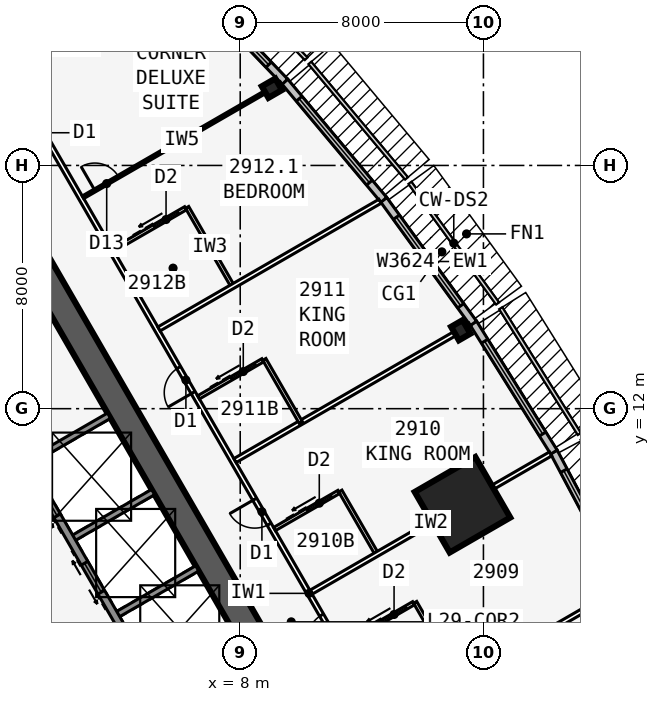
"""IFC4 building model, lengths in metres.
Left out: names, types, materials, properties, quantities, classifications, styles, units other than length and angle.
Written with IfcOpenShell. Run it as: python <this file> out.ifc"""

import sys

from ifc_helpers import new_model, si_unit, direction, frame, frame_2d, origin, origin_2d, place, context, subcontext, project, spatial, rectangle, i_section, extrude, element, fill, save


model = new_model("IFC4")
c1 = context("Model", 3, precision=1e-05, world=origin(), true_north=direction((0.0, 1.0)))
c2 = subcontext(c1, "Body", "Model", "MODEL_VIEW")
j1 = project(units=[si_unit("LENGTHUNIT", "METRE"), si_unit("PLANEANGLEUNIT", "RADIAN")], contexts=[c1])
p1 = place(None, origin())
s1 = spatial("IfcSite", under=j1, at=p1, CompositionType="ELEMENT")
p2 = place(p1, origin())
s2 = spatial("IfcBuilding", under=s1, at=p2, CompositionType="ELEMENT")
p3 = place(p2, frame((0.0, 0.0, 114.7)))
s3 = spatial("IfcBuildingStorey", under=s2, at=p3, CompositionType="ELEMENT", Elevation=114.7)
p4 = place(p3, frame((16.5, -9.526, 0.0), z_axis=(0.0, 0.0, 1.0), x_axis=(-0.499999749417, 0.866025548458, 0.0)))
e1 = element("IfcWall", 1, at=p4, inside=s3, PredefinedType="SHEAR", context=c2, shape_type="SweptSolid", body=[
    extrude(rectangle(XDim=33.0, YDim=0.9, at=frame_2d((16.5, 0.0))), origin(), (0.0, 0.0, 1.0), 3.4),
])
p5 = place(p4, frame((14.15, 0.0, 0.0)))
e2 = element("IfcOpeningElement", 2, at=p5, cuts=e1, PredefinedType="OPENING", context=c2, shape_type="SweptSolid", body=[
    extrude(rectangle(XDim=1.8, YDim=2.13, at=frame_2d((0.9, 1.065))), frame((0.0, 0.46, 0.0), z_axis=(0.0, -1.0, 0.0), x_axis=(1.0, 0.0, 0.0)), (0.0, 0.0, 1.0), 0.92),
])
p6 = place(p4, frame((12.6, 0.0, 0.0)))
e3 = element("IfcOpeningElement", 3, at=p6, cuts=e1, PredefinedType="OPENING", context=c2, shape_type="SweptSolid", body=[
    extrude(rectangle(XDim=1.0, YDim=2.13, at=frame_2d((0.5, 1.065))), frame((0.0, 0.46, 0.0), z_axis=(0.0, -1.0, 0.0), x_axis=(1.0, 0.0, 0.0)), (0.0, 0.0, 1.0), 0.92),
])
p7 = place(p3, frame((5.379, 2.586, 0.0), z_axis=(0.0, 0.0, 1.0), x_axis=(-0.500001375892, 0.866024609411, 0.0)))
e4 = element("IfcWall", 4, at=p7, inside=s3, PredefinedType="SOLIDWALL", context=c2, shape_type="SweptSolid", body=[
    extrude(rectangle(XDim=10.633, YDim=0.25, at=frame_2d((5.316, 0.0))), origin(), (0.0, 0.0, 1.0), 3.235),
])
p8 = place(p7, frame((9.164, 0.0, 0.0)))
e5 = element("IfcOpeningElement", 5, at=p8, cuts=e4, PredefinedType="OPENING", context=c2, shape_type="SweptSolid", body=[
    extrude(rectangle(XDim=0.9, YDim=2.13, at=frame_2d((0.45, 1.065))), frame((0.0, 0.135, 0.0), z_axis=(0.0, -1.0, 0.0), x_axis=(1.0, 0.0, 0.0)), (0.0, 0.0, 1.0), 0.27),
])
p9 = place(p7, frame((1.0, 0.0, 0.0)))
e6 = element("IfcOpeningElement", 6, at=p9, cuts=e4, PredefinedType="OPENING", context=c2, shape_type="SweptSolid", body=[
    extrude(rectangle(XDim=1.1, YDim=2.13, at=frame_2d((0.55, 1.065))), frame((0.0, 0.135, 0.0), z_axis=(0.0, -1.0, 0.0), x_axis=(1.0, 0.0, 0.0)), (0.0, 0.0, 1.0), 0.27),
])
p10 = place(p7, frame((3.9, 0.0, 0.0)))
e7 = element("IfcOpeningElement", 7, at=p10, cuts=e4, PredefinedType="OPENING", context=c2, shape_type="SweptSolid", body=[
    extrude(rectangle(XDim=1.1, YDim=2.13, at=frame_2d((0.55, 1.065))), frame((0.0, 0.135, 0.0), z_axis=(0.0, -1.0, 0.0), x_axis=(1.0, 0.0, 0.0)), (0.0, 0.0, 1.0), 0.27),
])
p11 = place(p7, frame((6.8, 0.0, 0.0)))
e8 = element("IfcOpeningElement", 8, at=p11, cuts=e4, PredefinedType="OPENING", context=c2, shape_type="SweptSolid", body=[
    extrude(rectangle(XDim=1.1, YDim=2.13, at=frame_2d((0.55, 1.065))), frame((0.0, 0.135, 0.0), z_axis=(0.0, -1.0, 0.0), x_axis=(1.0, 0.0, 0.0)), (0.0, 0.0, 1.0), 0.27),
])
for number, where, z_axis, x_axis in (
    (9, (3.879, 5.184, 0.0), (0.0, 0.0, 1.0), (0.866, 0.5, 0.0)),
    (10, (2.429, 7.696, 0.0), (0.0, 0.0, 1.0), (0.866, 0.5, 0.0)),
    (11, (0.979, 10.207, 0.0), (0.0, 0.0, 1.0), (0.866, 0.5, 0.0)),
):
    element("IfcWall", number, at=place(p3, frame(where, z_axis=z_axis, x_axis=x_axis)), inside=s3, PredefinedType="SOLIDWALL", context=c2, shape_type="SweptSolid", body=[
        extrude(rectangle(XDim=3.125, YDim=0.2, at=frame_2d((1.562, 0.0))), origin(), (0.0, 0.0, 1.0), 3.235),
    ])
for number, where, z_axis, x_axis in (
    (12, (15.254, 14.58, 0.0), (0.0, 0.0, 1.0), (0.866, 0.5, 0.0)),
    (13, (9.041, 22.541, 0.0), (0.0, 0.0, 1.0), (-0.5, 0.866, 0.0)),
):
    element("IfcColumn", number, at=place(p3, frame(where, z_axis=z_axis, x_axis=x_axis)), inside=s3, PredefinedType="COLUMN", context=c2, shape_type="SweptSolid", body=[
        extrude(i_section(OverallWidth=0.437, OverallDepth=0.513, WebThickness=0.061, FlangeThickness=0.097, at=origin_2d()), origin(), (0.0, 0.0, 1.0), 3.4),
    ])
p12 = place(p3, frame((15.312, 8.84, 0.0), z_axis=(0.0, 0.0, 1.0), x_axis=(0.866025403784, 0.5, 0.0)))
e14 = element("IfcColumn", 14, at=p12, inside=s3, PredefinedType="COLUMN", context=c2, shape_type="SweptSolid", body=[
    extrude(rectangle(XDim=2.3, YDim=2.3, at=origin_2d()), origin(), (0.0, 0.0, 1.0), 3.4),
])
p13 = place(p3, frame((20.663, 6.161, 0.0), z_axis=(0.0, 0.0, 1.0), x_axis=(-0.469404966864, 0.882982999317, 0.0)))
e15 = element("IfcWall", 15, at=p13, inside=s3, PredefinedType="STANDARD", context=c2, shape_type="SweptSolid", body=[
    extrude(rectangle(XDim=5.003, YDim=0.25, at=frame_2d((2.501, 0.0))), origin(), (0.0, 0.0, 1.0), 3.235),
])
p14 = place(p13, frame((0.701, 0.0, 0.45)))
e16 = element("IfcOpeningElement", 16, at=p14, cuts=e15, PredefinedType="OPENING", context=c2, shape_type="SweptSolid", body=[
    extrude(rectangle(XDim=3.6, YDim=2.4, at=frame_2d((1.8, 1.2))), frame((0.0, 0.135, 0.0), z_axis=(0.0, -1.0, 0.0), x_axis=(1.0, 0.0, 0.0)), (0.0, 0.0, 1.0), 0.27),
])
p15 = place(p3, frame((18.319, 10.571, 0.0), z_axis=(0.0, 0.0, 1.0), x_axis=(-0.529990167382, 0.84800378683, 0.0)))
e17 = element("IfcWall", 17, at=p15, inside=s3, PredefinedType="STANDARD", context=c2, shape_type="SweptSolid", body=[
    extrude(rectangle(XDim=5.003, YDim=0.25, at=frame_2d((2.501, 0.0))), origin(), (0.0, 0.0, 1.0), 3.235),
])
p16 = place(p15, frame((0.701, 0.0, 0.45)))
e18 = element("IfcOpeningElement", 18, at=p16, cuts=e17, PredefinedType="OPENING", context=c2, shape_type="SweptSolid", body=[
    extrude(rectangle(XDim=3.6, YDim=2.4, at=frame_2d((1.8, 1.2))), frame((0.0, 0.135, 0.0), z_axis=(0.0, -1.0, 0.0), x_axis=(1.0, 0.0, 0.0)), (0.0, 0.0, 1.0), 0.27),
])
p17 = place(p3, frame((15.672, 14.807, 0.0), z_axis=(0.0, 0.0, 1.0), x_axis=(-0.587669188412, 0.809101307001, 0.0)))
e19 = element("IfcWall", 19, at=p17, inside=s3, PredefinedType="STANDARD", context=c2, shape_type="SweptSolid", body=[
    extrude(rectangle(XDim=5.028, YDim=0.25, at=frame_2d((2.514, 0.0))), origin(), (0.0, 0.0, 1.0), 3.235),
])
p18 = place(p17, frame((0.714, 0.0, 0.45)))
e20 = element("IfcOpeningElement", 20, at=p18, cuts=e19, PredefinedType="OPENING", context=c2, shape_type="SweptSolid", body=[
    extrude(rectangle(XDim=3.6, YDim=2.4, at=frame_2d((1.8, 1.2))), frame((0.0, 0.135, 0.0), z_axis=(0.0, -1.0, 0.0), x_axis=(1.0, 0.0, 0.0)), (0.0, 0.0, 1.0), 0.27),
])
p19 = place(p3, frame((12.723, 18.868, 0.0), z_axis=(0.0, 0.0, 1.0), x_axis=(-0.641810386606, 0.766863369607, 0.0)))
e21 = element("IfcWall", 21, at=p19, inside=s3, PredefinedType="STANDARD", context=c2, shape_type="SweptSolid", body=[
    extrude(rectangle(XDim=5.076, YDim=0.25, at=frame_2d((2.538, 0.0))), origin(), (0.0, 0.0, 1.0), 3.235),
])
p20 = place(p19, frame((0.738, 0.0, 0.45)))
e22 = element("IfcOpeningElement", 22, at=p20, cuts=e21, PredefinedType="OPENING", context=c2, shape_type="SweptSolid", body=[
    extrude(rectangle(XDim=3.6, YDim=2.4, at=frame_2d((1.8, 1.2))), frame((0.0, 0.135, 0.0), z_axis=(0.0, -1.0, 0.0), x_axis=(1.0, 0.0, 0.0)), (0.0, 0.0, 1.0), 0.27),
])
p21 = place(p3, frame((9.471, 22.754, 0.0), z_axis=(0.0, 0.0, 1.0), x_axis=(-0.691719937936, 0.722165858693, 0.0)))
e23 = element("IfcWall", 23, at=p21, inside=s3, PredefinedType="STANDARD", context=c2, shape_type="SweptSolid", body=[
    extrude(rectangle(XDim=5.148, YDim=0.25, at=frame_2d((2.574, 0.0))), origin(), (0.0, 0.0, 1.0), 3.235),
])
p22 = place(p21, frame((0.774, 0.0, 0.45)))
e24 = element("IfcOpeningElement", 24, at=p22, cuts=e23, PredefinedType="OPENING", context=c2, shape_type="SweptSolid", body=[
    extrude(rectangle(XDim=3.6, YDim=2.4, at=frame_2d((1.8, 1.2))), frame((0.0, 0.135, 0.0), z_axis=(0.0, -1.0, 0.0), x_axis=(1.0, 0.0, 0.0)), (0.0, 0.0, 1.0), 0.27),
])
p23 = place(p3, frame((20.027, -10.985, 0.0), z_axis=(0.0, 0.0, 1.0), x_axis=(-0.500001677587, 0.866024435227, 0.0)))
e25 = element("IfcWall", 25, at=p23, inside=s3, PredefinedType="PARTITIONING", context=c2, shape_type="SweptSolid", body=[
    extrude(rectangle(XDim=39.054, YDim=0.15, at=frame_2d((19.527, 0.0))), origin(), (0.0, 0.0, 1.0), 3.235),
])
p24 = place(p23, frame((0.352, 0.0, 0.0)))
e26 = element("IfcOpeningElement", 26, at=p24, cuts=e25, PredefinedType="OPENING", context=c2, shape_type="SweptSolid", body=[
    extrude(rectangle(XDim=0.95, YDim=2.13, at=frame_2d((0.475, 1.065))), frame((0.0, 0.085, 0.0), z_axis=(0.0, -1.0, 0.0), x_axis=(1.0, 0.0, 0.0)), (0.0, 0.0, 1.0), 0.17),
])
p25 = place(p23, frame((7.752, 0.0, 0.0)))
e27 = element("IfcOpeningElement", 27, at=p25, cuts=e25, PredefinedType="OPENING", context=c2, shape_type="SweptSolid", body=[
    extrude(rectangle(XDim=0.95, YDim=2.13, at=frame_2d((0.475, 1.065))), frame((0.0, 0.085, 0.0), z_axis=(0.0, -1.0, 0.0), x_axis=(1.0, 0.0, 0.0)), (0.0, 0.0, 1.0), 0.17),
])
p26 = place(p23, frame((17.752, 0.0, 0.0)))
e28 = element("IfcOpeningElement", 28, at=p26, cuts=e25, PredefinedType="OPENING", context=c2, shape_type="SweptSolid", body=[
    extrude(rectangle(XDim=0.95, YDim=2.13, at=frame_2d((0.475, 1.065))), frame((0.0, 0.085, 0.0), z_axis=(0.0, -1.0, 0.0), x_axis=(1.0, 0.0, 0.0)), (0.0, 0.0, 1.0), 0.17),
])
p27 = place(p23, frame((22.152, 0.0, 0.0)))
e29 = element("IfcOpeningElement", 29, at=p27, cuts=e25, PredefinedType="OPENING", context=c2, shape_type="SweptSolid", body=[
    extrude(rectangle(XDim=0.95, YDim=2.13, at=frame_2d((0.475, 1.065))), frame((0.0, 0.085, 0.0), z_axis=(0.0, -1.0, 0.0), x_axis=(1.0, 0.0, 0.0)), (0.0, 0.0, 1.0), 0.17),
])
p28 = place(p23, frame((27.152, 0.0, 0.0)))
e30 = element("IfcOpeningElement", 30, at=p28, cuts=e25, PredefinedType="OPENING", context=c2, shape_type="SweptSolid", body=[
    extrude(rectangle(XDim=0.95, YDim=2.13, at=frame_2d((0.475, 1.065))), frame((0.0, 0.085, 0.0), z_axis=(0.0, -1.0, 0.0), x_axis=(1.0, 0.0, 0.0)), (0.0, 0.0, 1.0), 0.17),
])
p29 = place(p23, frame((36.546, 0.0, 0.0)))
e31 = element("IfcOpeningElement", 31, at=p29, cuts=e25, PredefinedType="OPENING", context=c2, shape_type="SweptSolid", body=[
    extrude(rectangle(XDim=0.95, YDim=2.13, at=frame_2d((0.475, 1.065))), frame((0.0, 0.085, 0.0), z_axis=(0.0, -1.0, 0.0), x_axis=(1.0, 0.0, 0.0)), (0.0, 0.0, 1.0), 0.17),
])
p30 = place(p3, frame((12.829, 1.633, 0.0), z_axis=(0.0, 0.0, 1.0), x_axis=(0.866027015393, 0.499997208602, 0.0)))
e32 = element("IfcWall", 32, at=p30, inside=s3, PredefinedType="PARTITIONING", context=c2, shape_type="SweptSolid", body=[
    extrude(rectangle(XDim=8.922, YDim=0.15, at=frame_2d((4.461, 0.0))), origin(), (0.0, 0.0, 1.0), 2.389),
])
p31 = place(p3, frame((10.329, 5.963, 0.0), z_axis=(0.0, 0.0, 1.0), x_axis=(0.866025170687, 0.500000403736, 0.0)))
e33 = element("IfcWall", 33, at=p31, inside=s3, PredefinedType="PARTITIONING", context=c2, shape_type="SweptSolid", body=[
    extrude(rectangle(XDim=9.099, YDim=0.15, at=frame_2d((4.549, 0.0))), origin(), (0.0, 0.0, 1.0), 2.389),
])
p32 = place(p3, frame((7.829, 10.293, 0.0), z_axis=(0.0, 0.0, 1.0), x_axis=(0.866027015393, 0.499997208602, 0.0)))
e34 = element("IfcWall", 34, at=p32, inside=s3, PredefinedType="PARTITIONING", context=c2, shape_type="SweptSolid", body=[
    extrude(rectangle(XDim=8.922, YDim=0.15, at=frame_2d((4.461, 0.0))), origin(), (0.0, 0.0, 1.0), 2.389),
])
p33 = place(p3, frame((5.329, 14.623, 0.0), z_axis=(0.0, 0.0, 1.0), x_axis=(0.866011723728, 0.500023693804, 0.0)))
e35 = element("IfcWall", 35, at=p33, inside=s3, PredefinedType="PARTITIONING", context=c2, shape_type="SweptSolid", body=[
    extrude(rectangle(XDim=8.395, YDim=0.15, at=frame_2d((4.198, 0.0))), origin(), (0.0, 0.0, 1.0), 2.389),
])
p34 = place(p3, frame((2.829, 18.954, 0.0), z_axis=(0.0, 0.0, 1.0), x_axis=(0.866015739374, 0.500016738876, 0.0)))
e36 = element("IfcWall", 36, at=p34, inside=s3, PredefinedType="PARTITIONING", context=c2, shape_type="SweptSolid", body=[
    extrude(rectangle(XDim=7.516, YDim=0.1, at=frame_2d((3.758, 0.0))), origin(), (0.0, 0.0, 1.0), 2.389),
])
p35 = place(p34, frame((0.45, 0.0, 0.0)))
e37 = element("IfcOpeningElement", 37, at=p35, cuts=e36, PredefinedType="OPENING", context=c2, shape_type="SweptSolid", body=[
    extrude(rectangle(XDim=0.9, YDim=2.13, at=frame_2d((0.45, 1.065))), frame((0.0, 0.06, 0.0), z_axis=(0.0, -1.0, 0.0), x_axis=(1.0, 0.0, 0.0)), (0.0, 0.0, 1.0), 0.12),
])
p36 = place(p3, frame((15.253, 3.033, 0.0), z_axis=(0.0, 0.0, 1.0), x_axis=(-0.499990139034, 0.866031096941, 0.0)))
e38 = element("IfcWall", 38, at=p36, inside=s3, PredefinedType="PLUMBINGWALL", context=c2, shape_type="SweptSolid", body=[
    extrude(rectangle(XDim=3.0, YDim=0.12, at=frame_2d((1.5, 0.0))), origin(), (0.0, 0.0, 1.0), 3.235),
])
p37 = place(p3, frame((11.329, 4.231, 0.0), z_axis=(0.0, 0.0, 1.0), x_axis=(0.866035715982, 0.499982138324, 0.0)))
e39 = element("IfcWall", 39, at=p37, inside=s3, PredefinedType="PLUMBINGWALL", context=c2, shape_type="SweptSolid", body=[
    extrude(rectangle(XDim=2.74, YDim=0.12, at=frame_2d((1.37, 0.0))), origin(), (0.0, 0.0, 1.0), 3.235),
])
p38 = place(p37, frame((1.55, 0.0, 0.0)))
e40 = element("IfcOpeningElement", 40, at=p38, cuts=e39, PredefinedType="OPENING", context=c2, shape_type="SweptSolid", body=[
    extrude(rectangle(XDim=0.9, YDim=2.13, at=frame_2d((0.45, 1.065))), frame((0.0, 0.07, 0.0), z_axis=(0.0, -1.0, 0.0), x_axis=(1.0, 0.0, 0.0)), (0.0, 0.0, 1.0), 0.14),
])
p39 = place(p3, frame((12.493, 7.213, 0.0), z_axis=(0.0, 0.0, 1.0), x_axis=(-0.500001309137, 0.866024647952, 0.0)))
e41 = element("IfcWall", 41, at=p39, inside=s3, PredefinedType="PLUMBINGWALL", context=c2, shape_type="SweptSolid", body=[
    extrude(rectangle(XDim=2.4, YDim=0.12, at=frame_2d((1.2, 0.0))), origin(), (0.0, 0.0, 1.0), 3.235),
])
p40 = place(p3, frame((9.128, 8.042, 0.0), z_axis=(0.0, 0.0, 1.0), x_axis=(0.866005645448, 0.500034220881, 0.0)))
e42 = element("IfcWall", 42, at=p40, inside=s3, PredefinedType="PLUMBINGWALL", context=c2, shape_type="SweptSolid", body=[
    extrude(rectangle(XDim=2.44, YDim=0.12, at=frame_2d((1.22, 0.0))), origin(), (0.0, 0.0, 1.0), 3.235),
])
p41 = place(p40, frame((1.25, 0.0, 0.0)))
e43 = element("IfcOpeningElement", 43, at=p41, cuts=e42, PredefinedType="OPENING", context=c2, shape_type="SweptSolid", body=[
    extrude(rectangle(XDim=0.9, YDim=2.13, at=frame_2d((0.45, 1.065))), frame((0.0, 0.07, 0.0), z_axis=(0.0, -1.0, 0.0), x_axis=(1.0, 0.0, 0.0)), (0.0, 0.0, 1.0), 0.14),
])
p42 = place(p3, frame((9.993, 11.543, 0.0), z_axis=(0.0, 0.0, 1.0), x_axis=(-0.500001309137, 0.866024647952, 0.0)))
e44 = element("IfcWall", 44, at=p42, inside=s3, PredefinedType="PLUMBINGWALL", context=c2, shape_type="SweptSolid", body=[
    extrude(rectangle(XDim=2.4, YDim=0.12, at=frame_2d((1.2, 0.0))), origin(), (0.0, 0.0, 1.0), 3.235),
])
p43 = place(p3, frame((6.628, 12.372, 0.0), z_axis=(0.0, 0.0, 1.0), x_axis=(0.866005645448, 0.500034220881, 0.0)))
e45 = element("IfcWall", 45, at=p43, inside=s3, PredefinedType="PLUMBINGWALL", context=c2, shape_type="SweptSolid", body=[
    extrude(rectangle(XDim=2.44, YDim=0.12, at=frame_2d((1.22, 0.0))), origin(), (0.0, 0.0, 1.0), 3.235),
])
p44 = place(p43, frame((1.25, 0.0, 0.0)))
e46 = element("IfcOpeningElement", 46, at=p44, cuts=e45, PredefinedType="OPENING", context=c2, shape_type="SweptSolid", body=[
    extrude(rectangle(XDim=0.9, YDim=2.13, at=frame_2d((0.45, 1.065))), frame((0.0, 0.07, 0.0), z_axis=(0.0, -1.0, 0.0), x_axis=(1.0, 0.0, 0.0)), (0.0, 0.0, 1.0), 0.14),
])
p45 = place(p3, frame((7.753, 16.023, 0.0), z_axis=(0.0, 0.0, 1.0), x_axis=(-0.499990139034, 0.866031096941, 0.0)))
e47 = element("IfcWall", 47, at=p45, inside=s3, PredefinedType="PLUMBINGWALL", context=c2, shape_type="SweptSolid", body=[
    extrude(rectangle(XDim=3.0, YDim=0.12, at=frame_2d((1.5, 0.0))), origin(), (0.0, 0.0, 1.0), 3.235),
])
p46 = place(p3, frame((3.829, 17.221, 0.0), z_axis=(0.0, 0.0, 1.0), x_axis=(0.865997131366, 0.500048966069, 0.0)))
e48 = element("IfcWall", 48, at=p46, inside=s3, PredefinedType="PLUMBINGWALL", context=c2, shape_type="SweptSolid", body=[
    extrude(rectangle(XDim=2.74, YDim=0.12, at=frame_2d((1.37, 0.0))), origin(), (0.0, 0.0, 1.0), 3.235),
])
p47 = place(p46, frame((1.55, 0.0, 0.0)))
e49 = element("IfcOpeningElement", 49, at=p47, cuts=e48, PredefinedType="OPENING", context=c2, shape_type="SweptSolid", body=[
    extrude(rectangle(XDim=0.9, YDim=2.13, at=frame_2d((0.45, 1.065))), frame((0.0, 0.07, 0.0), z_axis=(0.0, -1.0, 0.0), x_axis=(1.0, 0.0, 0.0)), (0.0, 0.0, 1.0), 0.14),
])
p48 = place(p14, origin())
e50 = element("IfcWindow", 50, at=p48, inside=s3, PartitioningType="SINGLE_PANEL", PredefinedType="WINDOW", context=c2, shape_type="SweptSolid", body=[
    extrude(rectangle(XDim=3.6, YDim=2.4, at=frame_2d((1.8, 1.2))), frame((0.0, 0.03, 0.0), z_axis=(0.0, -1.0, 0.0), x_axis=(1.0, 0.0, 0.0)), (0.0, 0.0, 1.0), 0.06),
])
fill(e16, e50)
p49 = place(p16, origin())
e51 = element("IfcWindow", 51, at=p49, inside=s3, PartitioningType="SINGLE_PANEL", PredefinedType="WINDOW", context=c2, shape_type="SweptSolid", body=[
    extrude(rectangle(XDim=3.6, YDim=2.4, at=frame_2d((1.8, 1.2))), frame((0.0, 0.03, 0.0), z_axis=(0.0, -1.0, 0.0), x_axis=(1.0, 0.0, 0.0)), (0.0, 0.0, 1.0), 0.06),
])
fill(e18, e51)
p50 = place(p18, origin())
e52 = element("IfcWindow", 52, at=p50, inside=s3, PartitioningType="SINGLE_PANEL", PredefinedType="WINDOW", context=c2, shape_type="SweptSolid", body=[
    extrude(rectangle(XDim=3.6, YDim=2.4, at=frame_2d((1.8, 1.2))), frame((0.0, 0.03, 0.0), z_axis=(0.0, -1.0, 0.0), x_axis=(1.0, 0.0, 0.0)), (0.0, 0.0, 1.0), 0.06),
])
fill(e20, e52)
p51 = place(p20, origin())
e53 = element("IfcWindow", 53, at=p51, inside=s3, PartitioningType="SINGLE_PANEL", PredefinedType="WINDOW", context=c2, shape_type="SweptSolid", body=[
    extrude(rectangle(XDim=3.6, YDim=2.4, at=frame_2d((1.8, 1.2))), frame((0.0, 0.03, 0.0), z_axis=(0.0, -1.0, 0.0), x_axis=(1.0, 0.0, 0.0)), (0.0, 0.0, 1.0), 0.06),
])
fill(e22, e53)
p52 = place(p22, origin())
e54 = element("IfcWindow", 54, at=p52, inside=s3, PartitioningType="SINGLE_PANEL", PredefinedType="WINDOW", context=c2, shape_type="SweptSolid", body=[
    extrude(rectangle(XDim=3.6, YDim=2.4, at=frame_2d((1.8, 1.2))), frame((0.0, 0.03, 0.0), z_axis=(0.0, -1.0, 0.0), x_axis=(1.0, 0.0, 0.0)), (0.0, 0.0, 1.0), 0.06),
])
fill(e24, e54)
p53 = place(p35, origin())
e55 = element("IfcDoor", 55, at=p53, inside=s3, OperationType="SINGLE_SWING_LEFT", PredefinedType="DOOR", context=c2, shape_type="SweptSolid", body=[
    extrude(rectangle(XDim=0.9, YDim=2.13, at=frame_2d((0.45, 1.065))), frame((0.0, 0.025, 0.0), z_axis=(0.0, -1.0, 0.0), x_axis=(1.0, 0.0, 0.0)), (0.0, 0.0, 1.0), 0.05),
])
fill(e37, e55)
p54 = place(p38, origin())
e56 = element("IfcDoor", 56, at=p54, inside=s3, OperationType="SLIDING_TO_LEFT", PredefinedType="DOOR", context=c2, shape_type="SweptSolid", body=[
    extrude(rectangle(XDim=0.9, YDim=2.13, at=frame_2d((0.45, 1.065))), frame((0.0, 0.025, 0.0), z_axis=(0.0, -1.0, 0.0), x_axis=(1.0, 0.0, 0.0)), (0.0, 0.0, 1.0), 0.05),
])
fill(e40, e56)
p55 = place(p26, origin())
e57 = element("IfcDoor", 57, at=p55, inside=s3, OperationType="SINGLE_SWING_LEFT", PredefinedType="DOOR", context=c2, shape_type="SweptSolid", body=[
    extrude(rectangle(XDim=0.95, YDim=2.13, at=frame_2d((0.475, 1.065))), frame((0.0, 0.025, 0.0), z_axis=(0.0, -1.0, 0.0), x_axis=(1.0, 0.0, 0.0)), (0.0, 0.0, 1.0), 0.05),
])
fill(e28, e57)
p56 = place(p41, origin())
e58 = element("IfcDoor", 58, at=p56, inside=s3, OperationType="SLIDING_TO_LEFT", PredefinedType="DOOR", context=c2, shape_type="SweptSolid", body=[
    extrude(rectangle(XDim=0.9, YDim=2.13, at=frame_2d((0.45, 1.065))), frame((0.0, 0.025, 0.0), z_axis=(0.0, -1.0, 0.0), x_axis=(1.0, 0.0, 0.0)), (0.0, 0.0, 1.0), 0.05),
])
fill(e43, e58)
p57 = place(p27, origin())
e59 = element("IfcDoor", 59, at=p57, inside=s3, OperationType="SINGLE_SWING_RIGHT", PredefinedType="DOOR", context=c2, shape_type="SweptSolid", body=[
    extrude(rectangle(XDim=0.95, YDim=2.13, at=frame_2d((0.475, 1.065))), frame((0.0, 0.025, 0.0), z_axis=(0.0, -1.0, 0.0), x_axis=(1.0, 0.0, 0.0)), (0.0, 0.0, 1.0), 0.05),
])
fill(e29, e59)
p58 = place(p44, origin())
e60 = element("IfcDoor", 60, at=p58, inside=s3, OperationType="SLIDING_TO_LEFT", PredefinedType="DOOR", context=c2, shape_type="SweptSolid", body=[
    extrude(rectangle(XDim=0.9, YDim=2.13, at=frame_2d((0.45, 1.065))), frame((0.0, 0.025, 0.0), z_axis=(0.0, -1.0, 0.0), x_axis=(1.0, 0.0, 0.0)), (0.0, 0.0, 1.0), 0.05),
])
fill(e46, e60)
p59 = place(p28, origin())
e61 = element("IfcDoor", 61, at=p59, inside=s3, OperationType="SINGLE_SWING_LEFT", PredefinedType="DOOR", context=c2, shape_type="SweptSolid", body=[
    extrude(rectangle(XDim=0.95, YDim=2.13, at=frame_2d((0.475, 1.065))), frame((0.0, 0.025, 0.0), z_axis=(0.0, -1.0, 0.0), x_axis=(1.0, 0.0, 0.0)), (0.0, 0.0, 1.0), 0.05),
])
fill(e30, e61)
p60 = place(p47, origin())
e62 = element("IfcDoor", 62, at=p60, inside=s3, OperationType="SLIDING_TO_LEFT", PredefinedType="DOOR", context=c2, shape_type="SweptSolid", body=[
    extrude(rectangle(XDim=0.9, YDim=2.13, at=frame_2d((0.45, 1.065))), frame((0.0, 0.025, 0.0), z_axis=(0.0, -1.0, 0.0), x_axis=(1.0, 0.0, 0.0)), (0.0, 0.0, 1.0), 0.05),
])
fill(e49, e62)
p61 = place(p10, origin())
e63 = element("IfcDoor", 63, at=p61, inside=s3, OperationType="DOUBLE_DOOR_SLIDING", PredefinedType="USERDEFINED", context=c2, shape_type="SweptSolid", body=[
    extrude(rectangle(XDim=1.1, YDim=2.13, at=frame_2d((0.55, 1.065))), frame((0.0, 0.025, 0.0), z_axis=(0.0, -1.0, 0.0), x_axis=(1.0, 0.0, 0.0)), (0.0, 0.0, 1.0), 0.05),
])
fill(e7, e63)
p62 = place(p11, origin())
e64 = element("IfcDoor", 64, at=p62, inside=s3, OperationType="DOUBLE_DOOR_SLIDING", PredefinedType="USERDEFINED", context=c2, shape_type="SweptSolid", body=[
    extrude(rectangle(XDim=1.1, YDim=2.13, at=frame_2d((0.55, 1.065))), frame((0.0, 0.025, 0.0), z_axis=(0.0, -1.0, 0.0), x_axis=(1.0, 0.0, 0.0)), (0.0, 0.0, 1.0), 0.05),
])
fill(e8, e64)
save(model, sys.argv[1])
